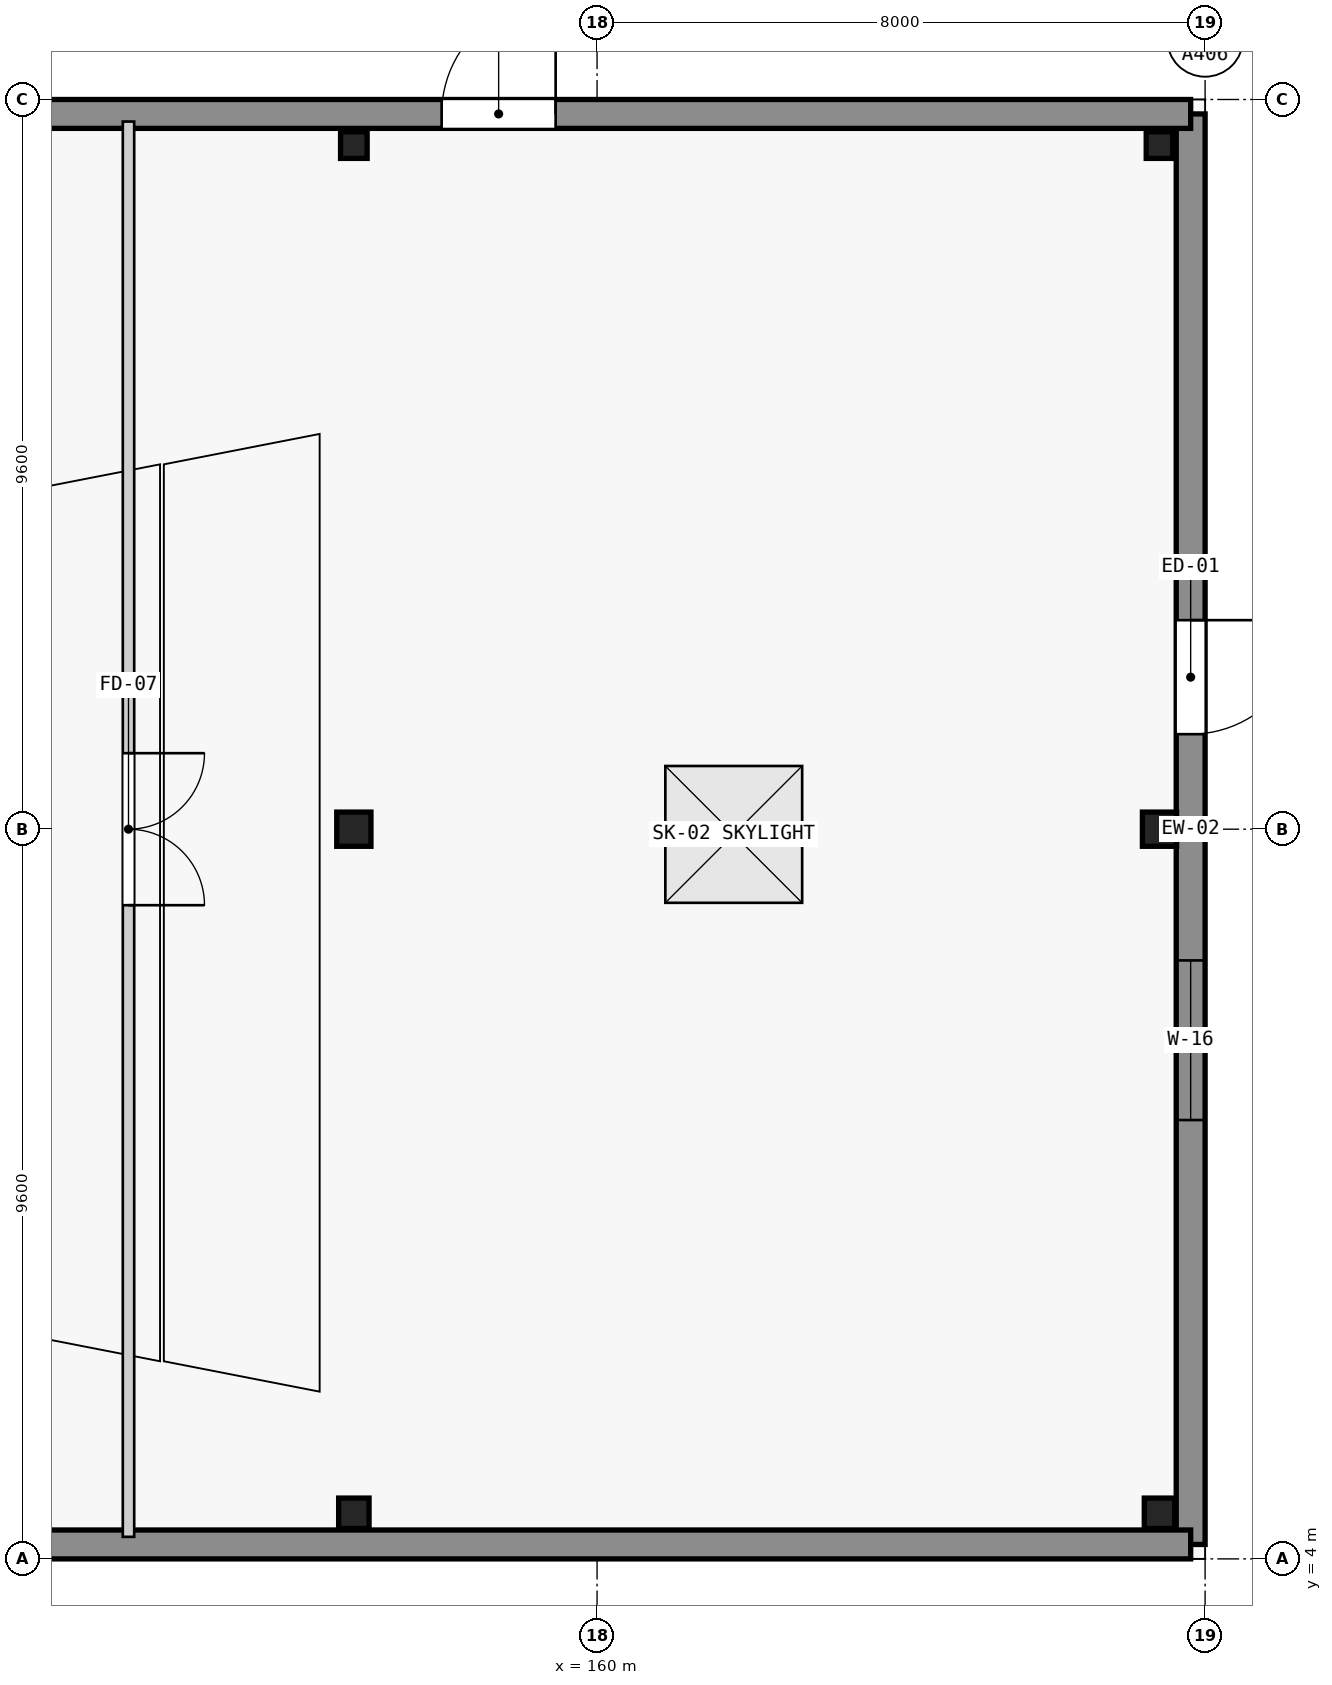
"""IFC4 building model, lengths in metres.
Left out: names, types, materials, properties, quantities, classifications, styles, units other than length and angle.
Written with IfcOpenShell. Run it as: python <this file> out.ifc"""

import sys

from ifc_helpers import new_model, si_unit, direction, frame, frame_2d, origin, origin_2d, place, context, subcontext, project, spatial, rectangle, extrude, element, fill, save


model = new_model("IFC4")
c1 = context("Model", 3, precision=1e-05, world=origin(), true_north=direction((0.0, 1.0)))
c2 = subcontext(c1, "Body", "Model", "MODEL_VIEW")
j1 = project(units=[si_unit("LENGTHUNIT", "METRE"), si_unit("PLANEANGLEUNIT", "RADIAN")], contexts=[c1])
p1 = place(None, origin())
s1 = spatial("IfcSite", under=j1, at=p1, CompositionType="ELEMENT")
p2 = place(p1, origin())
s2 = spatial("IfcBuilding", under=s1, at=p2, CompositionType="ELEMENT")
p3 = place(p2, origin())
s3 = spatial("IfcBuildingStorey", under=s2, at=p3, CompositionType="ELEMENT", Elevation=0.0)
p4 = place(p3, frame((156.8, 4.6, 0.0), z_axis=(0.0, 0.0, 1.0), x_axis=(1.0, 0.0, 0.0)))
e1 = element("IfcColumn", 1, at=p4, inside=s3, PredefinedType="COLUMN", context=c2, shape_type="SweptSolid", body=[
    extrude(rectangle(XDim=0.4, YDim=0.4, at=origin_2d()), origin(), (0.0, 0.0, 1.0), 5.4),
])
p5 = place(p3, frame((156.8, 13.6, 0.0), z_axis=(0.0, 0.0, 1.0), x_axis=(1.0, 0.0, 0.0)))
e2 = element("IfcColumn", 2, at=p5, inside=s3, PredefinedType="COLUMN", context=c2, shape_type="SweptSolid", body=[
    extrude(rectangle(XDim=0.45, YDim=0.45, at=origin_2d()), origin(), (0.0, 0.0, 1.0), 5.4),
])
p6 = place(p3, frame((156.8, 22.6, 0.0), z_axis=(0.0, 0.0, 1.0), x_axis=(1.0, 0.0, 0.0)))
e3 = element("IfcColumn", 3, at=p6, inside=s3, PredefinedType="COLUMN", context=c2, shape_type="SweptSolid", body=[
    extrude(rectangle(XDim=0.35, YDim=0.35, at=origin_2d()), origin(), (0.0, 0.0, 1.0), 5.4),
])
p7 = place(p3, frame((167.4, 4.6, 0.0), z_axis=(0.0, 0.0, 1.0), x_axis=(1.0, 0.0, 0.0)))
e4 = element("IfcColumn", 4, at=p7, inside=s3, PredefinedType="COLUMN", context=c2, shape_type="SweptSolid", body=[
    extrude(rectangle(XDim=0.4, YDim=0.4, at=origin_2d()), origin(), (0.0, 0.0, 1.0), 5.4),
])
p8 = place(p3, frame((167.4, 13.6, 0.0), z_axis=(0.0, 0.0, 1.0), x_axis=(1.0, 0.0, 0.0)))
e5 = element("IfcColumn", 5, at=p8, inside=s3, PredefinedType="COLUMN", context=c2, shape_type="SweptSolid", body=[
    extrude(rectangle(XDim=0.45, YDim=0.45, at=origin_2d()), origin(), (0.0, 0.0, 1.0), 5.4),
])
p9 = place(p3, frame((167.4, 22.6, 0.0), z_axis=(0.0, 0.0, 1.0), x_axis=(1.0, 0.0, 0.0)))
e6 = element("IfcColumn", 6, at=p9, inside=s3, PredefinedType="COLUMN", context=c2, shape_type="SweptSolid", body=[
    extrude(rectangle(XDim=0.35, YDim=0.35, at=origin_2d()), origin(), (0.0, 0.0, 1.0), 5.4),
])
p10 = place(p3, frame((167.81, 23.01, 0.0), z_axis=(0.0, 0.0, 1.0), x_axis=(0.0, -1.0, 0.0)))
e7 = element("IfcWall", 7, at=p10, inside=s3, PredefinedType="STANDARD", context=c2, shape_type="SweptSolid", body=[
    extrude(rectangle(XDim=18.82, YDim=0.38, at=frame_2d((9.41, 0.0))), origin(), (0.0, 0.0, 1.0), 5.14),
])
p11 = place(p10, frame((6.66, 0.0, 0.0)))
e8 = element("IfcOpeningElement", 8, at=p11, cuts=e7, PredefinedType="OPENING", context=c2, shape_type="SweptSolid", body=[
    extrude(rectangle(XDim=1.5, YDim=2.3, at=frame_2d((0.75, 1.15))), frame((0.0, 0.2, 0.0), z_axis=(0.0, -1.0, 0.0), x_axis=(1.0, 0.0, 0.0)), (0.0, 0.0, 1.0), 0.4),
])
p12 = place(p10, frame((11.136, 0.0, 1.65)))
e9 = element("IfcOpeningElement", 9, at=p12, cuts=e7, PredefinedType="OPENING", context=c2, shape_type="SweptSolid", body=[
    extrude(rectangle(XDim=2.1, YDim=1.6, at=frame_2d((1.05, 0.8))), frame((0.0, 0.2, 0.0), z_axis=(0.0, -1.0, 0.0), x_axis=(1.0, 0.0, 0.0)), (0.0, 0.0, 1.0), 0.4),
])
p13 = place(p3, frame((167.81, 4.19, 0.0), z_axis=(0.0, 0.0, 1.0), x_axis=(-1.0, 0.0, 0.0)))
e10 = element("IfcWall", 10, at=p13, inside=s3, PredefinedType="STANDARD", context=c2, shape_type="SweptSolid", body=[
    extrude(rectangle(XDim=55.52, YDim=0.38, at=frame_2d((27.76, 0.0))), origin(), (0.0, 0.0, 1.0), 5.14),
])
p14 = place(p13, frame((25.01, 0.0, 0.0)))
e11 = element("IfcOpeningElement", 11, at=p14, cuts=e10, PredefinedType="OPENING", context=c2, shape_type="SweptSolid", body=[
    extrude(rectangle(XDim=1.5, YDim=2.3, at=frame_2d((0.75, 1.15))), frame((0.0, 0.2, 0.0), z_axis=(0.0, -1.0, 0.0), x_axis=(1.0, 0.0, 0.0)), (0.0, 0.0, 1.0), 0.4),
])
p15 = place(p13, frame((30.07, 0.0, 1.65)))
e12 = element("IfcOpeningElement", 12, at=p15, cuts=e10, PredefinedType="OPENING", context=c2, shape_type="SweptSolid", body=[
    extrude(rectangle(XDim=2.4, YDim=1.8, at=frame_2d((1.2, 0.9))), frame((0.0, 0.2, 0.0), z_axis=(0.0, -1.0, 0.0), x_axis=(1.0, 0.0, 0.0)), (0.0, 0.0, 1.0), 0.4),
])
p16 = place(p13, frame((20.36, 0.0, 0.0)))
e13 = element("IfcOpeningElement", 13, at=p16, cuts=e10, PredefinedType="OPENING", context=c2, shape_type="SweptSolid", body=[
    extrude(rectangle(XDim=1.5, YDim=2.3, at=frame_2d((0.75, 1.15))), frame((0.0, 0.2, 0.0), z_axis=(0.0, -1.0, 0.0), x_axis=(1.0, 0.0, 0.0)), (0.0, 0.0, 1.0), 0.4),
])
p17 = place(p3, frame((145.6, 23.01, 0.0), z_axis=(0.0, 0.0, 1.0), x_axis=(1.0, 0.0, 0.0)))
e14 = element("IfcWall", 14, at=p17, inside=s3, PredefinedType="STANDARD", context=c2, shape_type="SweptSolid", body=[
    extrude(rectangle(XDim=22.21, YDim=0.38, at=frame_2d((11.105, 0.0))), origin(), (0.0, 0.0, 1.0), 5.14),
])
p18 = place(p17, frame((12.355, 0.0, 0.0)))
e15 = element("IfcOpeningElement", 15, at=p18, cuts=e14, PredefinedType="OPENING", context=c2, shape_type="SweptSolid", body=[
    extrude(rectangle(XDim=1.5, YDim=2.3, at=frame_2d((0.75, 1.15))), frame((0.0, 0.2, 0.0), z_axis=(0.0, -1.0, 0.0), x_axis=(1.0, 0.0, 0.0)), (0.0, 0.0, 1.0), 0.4),
])
p19 = place(p3, frame((153.835, 22.91, 0.0), z_axis=(0.0, 0.0, 1.0), x_axis=(0.0, -1.0, 0.0)))
e16 = element("IfcWall", 16, at=p19, inside=s3, PredefinedType="PARTITIONING", context=c2, shape_type="SweptSolid", body=[
    extrude(rectangle(XDim=18.62, YDim=0.15, at=frame_2d((9.31, 0.0))), origin(), (0.0, 0.0, 1.0), 4.32),
])
p20 = place(p19, frame((8.31, 0.0, 0.0)))
e17 = element("IfcOpeningElement", 17, at=p20, cuts=e16, PredefinedType="OPENING", context=c2, shape_type="SweptSolid", body=[
    extrude(rectangle(XDim=2.0, YDim=2.25, at=frame_2d((1.0, 1.125))), frame((0.0, 0.085, 0.0), z_axis=(0.0, -1.0, 0.0), x_axis=(1.0, 0.0, 0.0)), (0.0, 0.0, 1.0), 0.17),
])
p21 = place(p11, origin())
e18 = element("IfcDoor", 18, at=p21, inside=s3, OperationType="SINGLE_SWING_LEFT", PredefinedType="DOOR", context=c2, shape_type="SweptSolid", body=[
    extrude(rectangle(XDim=1.5, YDim=2.3, at=frame_2d((0.75, 1.15))), frame((0.0, 0.025, 0.0), z_axis=(0.0, -1.0, 0.0), x_axis=(1.0, 0.0, 0.0)), (0.0, 0.0, 1.0), 0.05),
])
fill(e8, e18)
p22 = place(p12, origin())
e19 = element("IfcWindow", 19, at=p22, inside=s3, PartitioningType="SINGLE_PANEL", PredefinedType="WINDOW", context=c2, shape_type="SweptSolid", body=[
    extrude(rectangle(XDim=2.1, YDim=1.6, at=frame_2d((1.05, 0.8))), frame((0.0, 0.03, 0.0), z_axis=(0.0, -1.0, 0.0), x_axis=(1.0, 0.0, 0.0)), (0.0, 0.0, 1.0), 0.06),
])
fill(e9, e19)
p23 = place(p18, origin())
e20 = element("IfcDoor", 20, at=p23, inside=s3, OperationType="SINGLE_SWING_RIGHT", PredefinedType="DOOR", context=c2, shape_type="SweptSolid", body=[
    extrude(rectangle(XDim=1.5, YDim=2.3, at=frame_2d((0.75, 1.15))), frame((0.0, 0.025, 0.0), z_axis=(0.0, -1.0, 0.0), x_axis=(1.0, 0.0, 0.0)), (0.0, 0.0, 1.0), 0.05),
])
fill(e15, e20)
p24 = place(p2, frame((0.0, 0.0, 26.7)))
p25 = place(p24, frame((0.0, 0.0, -21.56)))
p26 = place(p25, frame((161.798, 13.531, 0.0)))
p27 = place(p26, frame((0.0, 0.0, 0.21)))
e21 = element("IfcWindow", 21, at=p27, inside=s3, PartitioningType="SINGLE_PANEL", PredefinedType="SKYLIGHT", context=c2, shape_type="SweptSolid", body=[
    extrude(rectangle(XDim=1.8, YDim=1.8, at=origin_2d()), origin(), (0.0, 0.0, 1.0), 0.05),
])
p28 = place(p20, origin())
e22 = element("IfcDoor", 22, at=p28, inside=s3, OperationType="DOUBLE_DOOR_SINGLE_SWING", PredefinedType="DOOR", context=c2, shape_type="SweptSolid", body=[
    extrude(rectangle(XDim=2.0, YDim=2.25, at=frame_2d((1.0, 1.125))), frame((0.0, 0.025, 0.0), z_axis=(0.0, -1.0, 0.0), x_axis=(1.0, 0.0, 0.0)), (0.0, 0.0, 1.0), 0.05),
])
fill(e17, e22)
save(model, sys.argv[1])
